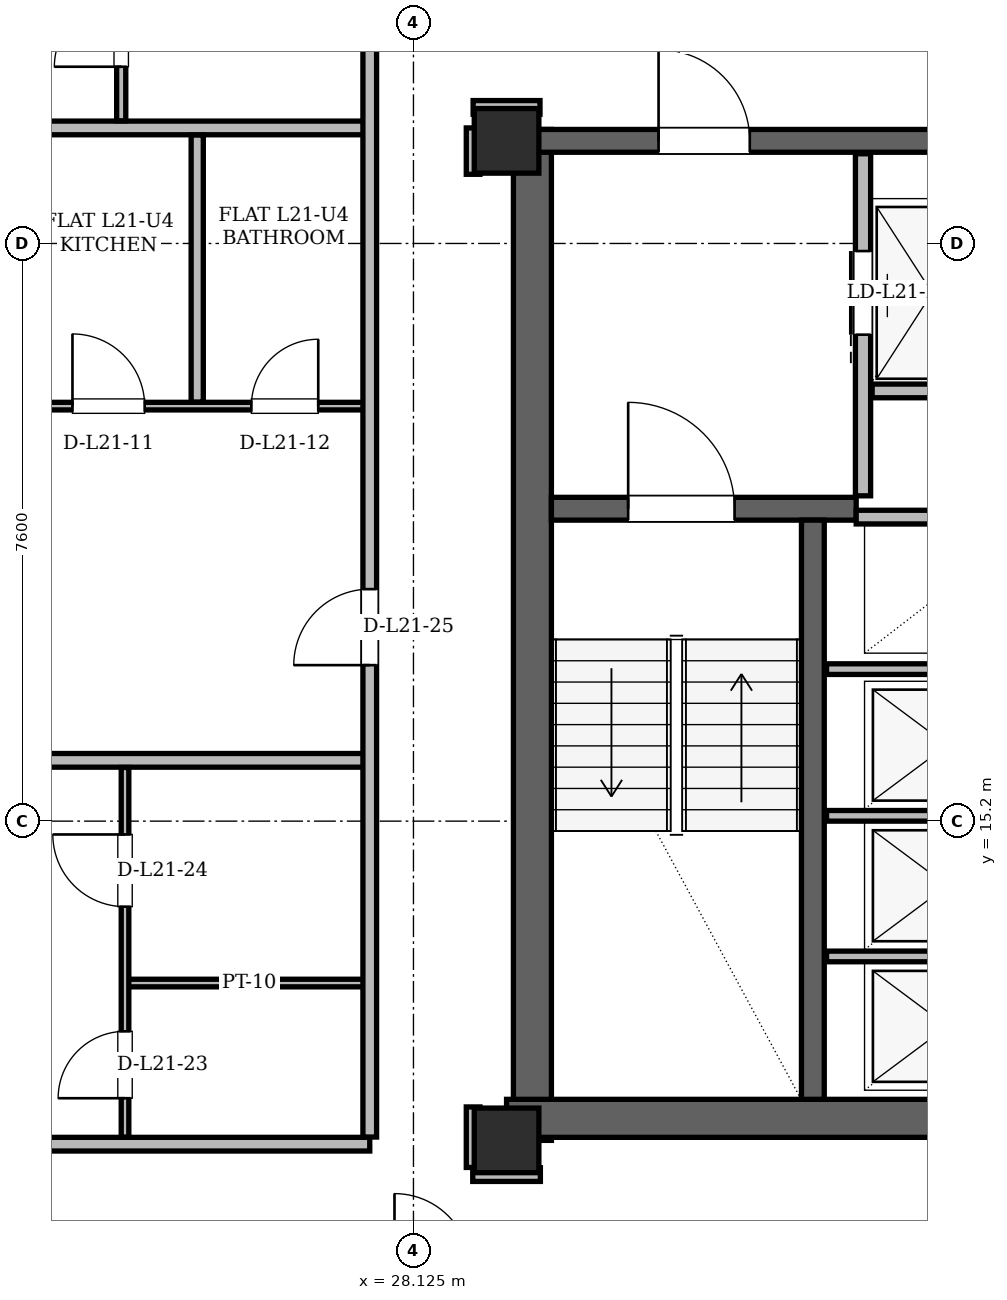
"""IFC4 building model, lengths in metres.
Left out: names, types, materials, properties, quantities, classifications, styles, units other than length and angle.
Written with IfcOpenShell. Run it as: python <this file> out.ifc"""

import sys

from ifc_helpers import new_model, si_unit, direction, frame, frame_2d, origin, origin_2d, place, context, subcontext, project, spatial, rectangle, hollow_rectangle, extrude, element, fill, save


model = new_model("IFC4")
c1 = context("Model", 3, precision=1e-05, world=origin(), true_north=direction((0.0, 1.0)))
c2 = subcontext(c1, "Body", "Model", "MODEL_VIEW")
j1 = project(units=[si_unit("LENGTHUNIT", "METRE"), si_unit("PLANEANGLEUNIT", "RADIAN")], contexts=[c1])
p1 = place(None, origin())
s1 = spatial("IfcSite", under=j1, at=p1, CompositionType="ELEMENT")
p2 = place(p1, origin())
s2 = spatial("IfcBuilding", under=s1, at=p2, CompositionType="ELEMENT")
p3 = place(p2, frame((0.0, 0.0, 82.5)))
s3 = spatial("IfcBuildingStorey", under=s2, at=p3, CompositionType="ELEMENT", Elevation=82.5)
for number, where, z_axis, x_axis in (
    (1, (29.35, 11.0, 0.0), (0.0, 0.0, 1.0), (1.0, 0.0, 0.0)),
    (2, (29.35, 24.15, 0.0), (0.0, 0.0, 1.0), (1.0, 0.0, 0.0)),
):
    element("IfcColumn", number, at=place(p3, frame(where, z_axis=z_axis, x_axis=x_axis)), inside=s3, PredefinedType="COLUMN", context=c2, shape_type="SweptSolid", body=[
        extrude(hollow_rectangle(XDim=0.85, YDim=0.85, WallThickness=0.07, at=origin_2d()), origin(), (0.0, 0.0, 1.0), 3.6),
    ])
p4 = place(p3, frame((29.69, 11.0, 0.0), z_axis=(0.0, 0.0, 1.0), x_axis=(0.0, 1.0, 0.0)))
e3 = element("IfcWall", 3, at=p4, inside=s3, PredefinedType="SHEAR", context=c2, shape_type="SweptSolid", body=[
    extrude(rectangle(XDim=13.3, YDim=0.5, at=frame_2d((6.65, 0.0))), origin(), (0.0, 0.0, 1.0), 3.36),
])
p5 = place(p3, frame((29.35, 11.29, 0.0), z_axis=(0.0, 0.0, 1.0), x_axis=(1.0, 0.0, 0.0)))
e4 = element("IfcWall", 4, at=p5, inside=s3, PredefinedType="SHEAR", context=c2, shape_type="SweptSolid", body=[
    extrude(rectangle(XDim=7.1, YDim=0.5, at=frame_2d((3.55, 0.0))), origin(), (0.0, 0.0, 1.0), 3.36),
])
p6 = place(p3, frame((29.65, 24.15, 0.0), z_axis=(0.0, 0.0, 1.0), x_axis=(1.0, 0.0, 0.0)))
e5 = element("IfcWall", 5, at=p6, inside=s3, PredefinedType="SHEAR", context=c2, shape_type="SweptSolid", body=[
    extrude(rectangle(XDim=15.7, YDim=0.3, at=frame_2d((7.85, 0.0))), origin(), (0.0, 0.0, 1.0), 3.36),
])
p7 = place(p6, frame((1.7, 0.0, 0.0)))
e6 = element("IfcOpeningElement", 6, at=p7, cuts=e5, PredefinedType="OPENING", context=c2, shape_type="SweptSolid", body=[
    extrude(rectangle(XDim=1.2, YDim=2.2, at=frame_2d((0.6, 1.1))), frame((0.0, 0.15, 0.0), z_axis=(0.0, -1.0, 0.0), x_axis=(1.0, 0.0, 0.0)), (0.0, 0.0, 1.0), 0.3),
])
p8 = place(p6, frame((12.8, 0.0, 0.0)))
e7 = element("IfcOpeningElement", 7, at=p8, cuts=e5, PredefinedType="OPENING", context=c2, shape_type="SweptSolid", body=[
    extrude(rectangle(XDim=1.2, YDim=2.2, at=frame_2d((0.6, 1.1))), frame((0.0, 0.15, 0.0), z_axis=(0.0, -1.0, 0.0), x_axis=(1.0, 0.0, 0.0)), (0.0, 0.0, 1.0), 0.3),
])
p9 = place(p6, frame((6.55, 0.0, 0.0)))
e8 = element("IfcOpeningElement", 8, at=p9, cuts=e5, PredefinedType="OPENING", context=c2, shape_type="SweptSolid", body=[
    extrude(rectangle(XDim=0.9, YDim=2.05, at=frame_2d((0.45, 1.025))), frame((0.0, 0.15, 0.0), z_axis=(0.0, -1.0, 0.0), x_axis=(1.0, 0.0, 0.0)), (0.0, 0.0, 1.0), 0.3),
])
p10 = place(p6, frame((8.45, 0.0, 0.0)))
e9 = element("IfcOpeningElement", 9, at=p10, cuts=e5, PredefinedType="OPENING", context=c2, shape_type="SweptSolid", body=[
    extrude(rectangle(XDim=0.9, YDim=2.05, at=frame_2d((0.45, 1.025))), frame((0.0, 0.15, 0.0), z_axis=(0.0, -1.0, 0.0), x_axis=(1.0, 0.0, 0.0)), (0.0, 0.0, 1.0), 0.3),
])
p11 = place(p3, frame((29.94, 19.31, 0.0), z_axis=(0.0, 0.0, 1.0), x_axis=(1.0, 0.0, 0.0)))
e10 = element("IfcWall", 10, at=p11, inside=s3, PredefinedType="SHEAR", context=c2, shape_type="SweptSolid", body=[
    extrude(rectangle(XDim=4.01, YDim=0.3, at=frame_2d((2.005, 0.0))), origin(), (0.0, 0.0, 1.0), 3.36),
])
p12 = place(p11, frame((1.01, 0.0, 0.0)))
e11 = element("IfcOpeningElement", 11, at=p12, cuts=e10, PredefinedType="OPENING", context=c2, shape_type="SweptSolid", body=[
    extrude(rectangle(XDim=1.4, YDim=2.2, at=frame_2d((0.7, 1.1))), frame((0.0, 0.15, 0.0), z_axis=(0.0, -1.0, 0.0), x_axis=(1.0, 0.0, 0.0)), (0.0, 0.0, 1.0), 0.3),
])
p13 = place(p3, frame((33.38, 11.54, 0.0), z_axis=(0.0, 0.0, 1.0), x_axis=(0.0, 1.0, 0.0)))
e12 = element("IfcWall", 12, at=p13, inside=s3, PredefinedType="SHEAR", context=c2, shape_type="SweptSolid", body=[
    extrude(rectangle(XDim=7.62, YDim=0.3, at=frame_2d((3.81, 0.0))), origin(), (0.0, 0.0, 1.0), 3.36),
])
p14 = place(p3, frame((31.079, 43.5, 0.0), z_axis=(0.0, 0.0, 1.0), x_axis=(-0.499998999238, -0.866025981574, 0.0)))
e13 = element("IfcWall", 13, at=p14, inside=s3, PredefinedType="SOLIDWALL", context=c2, shape_type="SweptSolid", body=[
    extrude(rectangle(XDim=34.108, YDim=0.34, at=frame_2d((17.054, 0.0))), origin(), (0.0, 0.0, 1.0), 2.578),
])
p15 = place(p14, frame((6.369, 0.0, 0.0)))
e14 = element("IfcOpeningElement", 14, at=p15, cuts=e13, PredefinedType="OPENING", context=c2, shape_type="SweptSolid", body=[
    extrude(rectangle(XDim=1.5, YDim=2.2, at=frame_2d((0.75, 1.1))), frame((0.0, 0.17, 0.0), z_axis=(0.0, -1.0, 0.0), x_axis=(1.0, 0.0, 0.0)), (0.0, 0.0, 1.0), 0.34),
])
p16 = place(p14, frame((26.044, 0.0, 0.0)))
e15 = element("IfcOpeningElement", 15, at=p16, cuts=e13, PredefinedType="OPENING", context=c2, shape_type="SweptSolid", body=[
    extrude(rectangle(XDim=1.5, YDim=2.2, at=frame_2d((0.75, 1.1))), frame((0.0, 0.17, 0.0), z_axis=(0.0, -1.0, 0.0), x_axis=(1.0, 0.0, 0.0)), (0.0, 0.0, 1.0), 0.34),
])
p17 = place(p14, frame((31.989, 0.0, 0.85)))
e16 = element("IfcOpeningElement", 16, at=p17, cuts=e13, PredefinedType="OPENING", context=c2, shape_type="SweptSolid", body=[
    extrude(rectangle(XDim=1.2, YDim=1.48, at=frame_2d((0.6, 0.74))), frame((0.0, 0.17, 0.0), z_axis=(0.0, -1.0, 0.0), x_axis=(1.0, 0.0, 0.0)), (0.0, 0.0, 1.0), 0.34),
])
p18 = place(p14, frame((29.607, 0.0, 0.85)))
e17 = element("IfcOpeningElement", 17, at=p18, cuts=e13, PredefinedType="OPENING", context=c2, shape_type="SweptSolid", body=[
    extrude(rectangle(XDim=1.2, YDim=1.48, at=frame_2d((0.6, 0.74))), frame((0.0, 0.17, 0.0), z_axis=(0.0, -1.0, 0.0), x_axis=(1.0, 0.0, 0.0)), (0.0, 0.0, 1.0), 0.34),
])
p19 = place(p14, frame((11.736, 0.0, 0.85)))
e18 = element("IfcOpeningElement", 18, at=p19, cuts=e13, PredefinedType="OPENING", context=c2, shape_type="SweptSolid", body=[
    extrude(rectangle(XDim=1.2, YDim=1.48, at=frame_2d((0.6, 0.74))), frame((0.0, 0.17, 0.0), z_axis=(0.0, -1.0, 0.0), x_axis=(1.0, 0.0, 0.0)), (0.0, 0.0, 1.0), 0.34),
])
p20 = place(p14, frame((14.635, 0.0, 0.85)))
e19 = element("IfcOpeningElement", 19, at=p20, cuts=e13, PredefinedType="OPENING", context=c2, shape_type="SweptSolid", body=[
    extrude(rectangle(XDim=1.2, YDim=1.48, at=frame_2d((0.6, 0.74))), frame((0.0, 0.17, 0.0), z_axis=(0.0, -1.0, 0.0), x_axis=(1.0, 0.0, 0.0)), (0.0, 0.0, 1.0), 0.34),
])
p21 = place(p14, frame((17.248, 0.0, 0.85)))
e20 = element("IfcOpeningElement", 20, at=p21, cuts=e13, PredefinedType="OPENING", context=c2, shape_type="SweptSolid", body=[
    extrude(rectangle(XDim=1.2, YDim=1.48, at=frame_2d((0.6, 0.74))), frame((0.0, 0.17, 0.0), z_axis=(0.0, -1.0, 0.0), x_axis=(1.0, 0.0, 0.0)), (0.0, 0.0, 1.0), 0.34),
])
p22 = place(p14, frame((1.22, 0.0, 0.85)))
e21 = element("IfcOpeningElement", 21, at=p22, cuts=e13, PredefinedType="OPENING", context=c2, shape_type="SweptSolid", body=[
    extrude(rectangle(XDim=1.2, YDim=1.48, at=frame_2d((0.6, 0.74))), frame((0.0, 0.17, 0.0), z_axis=(0.0, -1.0, 0.0), x_axis=(1.0, 0.0, 0.0)), (0.0, 0.0, 1.0), 0.34),
])
p23 = place(p3, frame((34.04, 19.48, 0.0), z_axis=(0.0, 0.0, 1.0), x_axis=(0.0, 1.0, 0.0)))
e22 = element("IfcWall", 22, at=p23, inside=s3, PredefinedType="PARTITIONING", context=c2, shape_type="SweptSolid", body=[
    extrude(rectangle(XDim=4.5, YDim=0.2, at=frame_2d((2.25, 0.0))), origin(), (0.0, 0.0, 1.0), 2.4),
])
p24 = place(p23, frame((2.12, 0.0, 0.0)))
e23 = element("IfcOpeningElement", 23, at=p24, cuts=e22, PredefinedType="OPENING", context=c2, shape_type="SweptSolid", body=[
    extrude(rectangle(XDim=1.1, YDim=2.2, at=frame_2d((0.55, 1.1))), frame((0.0, 0.1, 0.0), z_axis=(0.0, -1.0, 0.0), x_axis=(1.0, 0.0, 0.0)), (0.0, 0.0, 1.0), 0.2),
])
p25 = place(p3, frame((34.16, 20.86, 0.0), z_axis=(0.0, 0.0, 1.0), x_axis=(1.0, 0.0, 0.0)))
e24 = element("IfcWall", 24, at=p25, inside=s3, PredefinedType="PARTITIONING", context=c2, shape_type="SweptSolid", body=[
    extrude(rectangle(XDim=1.58, YDim=0.18, at=frame_2d((0.79, 0.0))), origin(), (0.0, 0.0, 1.0), 3.36),
])
p26 = place(p3, frame((33.95, 19.2, 0.0), z_axis=(0.0, 0.0, 1.0), x_axis=(1.0, 0.0, 0.0)))
e25 = element("IfcWall", 25, at=p26, inside=s3, PredefinedType="PARTITIONING", context=c2, shape_type="SweptSolid", body=[
    extrude(rectangle(XDim=2.27, YDim=0.18, at=frame_2d((1.135, 0.0))), origin(), (0.0, 0.0, 1.0), 3.36),
])
for number, where, z_axis, x_axis in (
    (26, (33.56, 13.42, 0.0), (0.0, 0.0, 1.0), (1.0, 0.0, 0.0)),
    (27, (33.56, 15.27, 0.0), (0.0, 0.0, 1.0), (1.0, 0.0, 0.0)),
    (28, (33.56, 17.2, 0.0), (0.0, 0.0, 1.0), (1.0, 0.0, 0.0)),
):
    element("IfcWall", number, at=place(p3, frame(where, z_axis=z_axis, x_axis=x_axis)), inside=s3, PredefinedType="PARTITIONING", context=c2, shape_type="SweptSolid", body=[
        extrude(rectangle(XDim=2.66, YDim=0.14, at=frame_2d((1.33, 0.0))), origin(), (0.0, 0.0, 1.0), 3.36),
    ])
p27 = place(p3, frame((28.905, 10.55, 0.0), z_axis=(0.0, 0.0, 1.0), x_axis=(1.0, 0.0, 0.0)))
e29 = element("IfcWall", 29, at=p27, inside=s3, PredefinedType="PARTITIONING", context=c2, shape_type="SweptSolid", body=[
    extrude(rectangle(XDim=0.89, YDim=0.18, at=frame_2d((0.445, 0.0))), origin(), (0.0, 0.0, 1.0), 3.36),
])
p28 = place(p3, frame((15.964, 10.95, 0.0), z_axis=(0.0, 0.0, 1.0), x_axis=(1.0, 0.0, 0.0)))
e30 = element("IfcWall", 30, at=p28, inside=s3, PredefinedType="PARTITIONING", context=c2, shape_type="SweptSolid", body=[
    extrude(rectangle(XDim=11.586, YDim=0.18, at=frame_2d((5.793, 0.0))), origin(), (0.0, 0.0, 1.0), 3.36),
])
p29 = place(p28, frame((4.873, 0.0, 0.0)))
e31 = element("IfcOpeningElement", 31, at=p29, cuts=e30, PredefinedType="OPENING", context=c2, shape_type="SweptSolid", body=[
    extrude(rectangle(XDim=1.0, YDim=2.18, at=frame_2d((0.5, 1.09))), frame((0.0, 0.09, 0.0), z_axis=(0.0, -1.0, 0.0), x_axis=(1.0, 0.0, 0.0)), (0.0, 0.0, 1.0), 0.18),
])
p30 = place(p3, frame((24.33, 13.07, 0.0), z_axis=(0.0, 0.0, 1.0), x_axis=(1.0, 0.0, 0.0)))
e32 = element("IfcWall", 32, at=p30, inside=s3, PredefinedType="PARTITIONING", context=c2, shape_type="SweptSolid", body=[
    extrude(rectangle(XDim=3.27, YDim=0.1, at=frame_2d((1.635, 0.0))), origin(), (0.0, 0.0, 1.0), 3.36),
])
p31 = place(p3, frame((15.403, 16.0, 0.0), z_axis=(0.0, 0.0, 1.0), x_axis=(1.0, 0.0, 0.0)))
e33 = element("IfcWall", 33, at=p31, inside=s3, PredefinedType="PARTITIONING", context=c2, shape_type="SweptSolid", body=[
    extrude(rectangle(XDim=12.147, YDim=0.18, at=frame_2d((6.074, 0.0))), origin(), (0.0, 0.0, 1.0), 3.36),
])
p32 = place(p3, frame((18.093, 20.66, 0.0), z_axis=(0.0, 0.0, 1.0), x_axis=(1.0, 0.0, 0.0)))
e34 = element("IfcWall", 34, at=p32, inside=s3, PredefinedType="PARTITIONING", context=c2, shape_type="SweptSolid", body=[
    extrude(rectangle(XDim=9.507, YDim=0.1, at=frame_2d((4.753, 0.0))), origin(), (0.0, 0.0, 1.0), 3.36),
])
p33 = place(p32, frame((0.89, 0.0, 0.0)))
e35 = element("IfcOpeningElement", 35, at=p33, cuts=e34, PredefinedType="OPENING", context=c2, shape_type="SweptSolid", body=[
    extrude(rectangle(XDim=0.95, YDim=2.1, at=frame_2d((0.475, 1.05))), frame((0.0, 0.05, 0.0), z_axis=(0.0, -1.0, 0.0), x_axis=(1.0, 0.0, 0.0)), (0.0, 0.0, 1.0), 0.1),
])
p34 = place(p32, frame((3.344, 0.0, 0.0)))
e36 = element("IfcOpeningElement", 36, at=p34, cuts=e34, PredefinedType="OPENING", context=c2, shape_type="SweptSolid", body=[
    extrude(rectangle(XDim=0.95, YDim=2.1, at=frame_2d((0.475, 1.05))), frame((0.0, 0.05, 0.0), z_axis=(0.0, -1.0, 0.0), x_axis=(1.0, 0.0, 0.0)), (0.0, 0.0, 1.0), 0.1),
])
p35 = place(p32, frame((5.545, 0.0, 0.0)))
e37 = element("IfcOpeningElement", 37, at=p35, cuts=e34, PredefinedType="OPENING", context=c2, shape_type="SweptSolid", body=[
    extrude(rectangle(XDim=0.95, YDim=2.1, at=frame_2d((0.475, 1.05))), frame((0.0, 0.05, 0.0), z_axis=(0.0, -1.0, 0.0), x_axis=(1.0, 0.0, 0.0)), (0.0, 0.0, 1.0), 0.1),
])
p36 = place(p32, frame((7.899, 0.0, 0.0)))
e38 = element("IfcOpeningElement", 38, at=p36, cuts=e34, PredefinedType="OPENING", context=c2, shape_type="SweptSolid", body=[
    extrude(rectangle(XDim=0.88, YDim=2.08, at=frame_2d((0.44, 1.04))), frame((0.0, 0.05, 0.0), z_axis=(0.0, -1.0, 0.0), x_axis=(1.0, 0.0, 0.0)), (0.0, 0.0, 1.0), 0.1),
])
p37 = place(p3, frame((20.206, 24.32, 0.0), z_axis=(0.0, 0.0, 1.0), x_axis=(1.0, 0.0, 0.0)))
e39 = element("IfcWall", 39, at=p37, inside=s3, PredefinedType="PARTITIONING", context=c2, shape_type="SweptSolid", body=[
    extrude(rectangle(XDim=7.344, YDim=0.18, at=frame_2d((3.672, 0.0))), origin(), (0.0, 0.0, 1.0), 3.36),
])
p38 = place(p3, frame((28.91, 24.59, 0.0), z_axis=(0.0, 0.0, 1.0), x_axis=(1.0, 0.0, 0.0)))
e40 = element("IfcWall", 40, at=p38, inside=s3, PredefinedType="PARTITIONING", context=c2, shape_type="SweptSolid", body=[
    extrude(rectangle(XDim=0.88, YDim=0.18, at=frame_2d((0.44, 0.0))), origin(), (0.0, 0.0, 1.0), 2.814),
])
p39 = place(p3, frame((24.28, 24.414, 0.0), z_axis=(0.0, 0.0, 1.0), x_axis=(0.0, 1.0, 0.0)))
e41 = element("IfcWall", 41, at=p39, inside=s3, PredefinedType="PARTITIONING", context=c2, shape_type="SweptSolid", body=[
    extrude(rectangle(XDim=6.962, YDim=0.12, at=frame_2d((3.481, 0.0))), origin(), (0.0, 0.0, 1.0), 2.578),
])
p40 = place(p39, frame((0.711, 0.0, 0.0)))
e42 = element("IfcOpeningElement", 42, at=p40, cuts=e41, PredefinedType="OPENING", context=c2, shape_type="SweptSolid", body=[
    extrude(rectangle(XDim=0.88, YDim=2.08, at=frame_2d((0.44, 1.04))), frame((0.0, 0.06, 0.0), z_axis=(0.0, -1.0, 0.0), x_axis=(1.0, 0.0, 0.0)), (0.0, 0.0, 1.0), 0.12),
])
p41 = place(p39, frame((4.258, 0.0, 0.0)))
e43 = element("IfcOpeningElement", 43, at=p41, cuts=e41, PredefinedType="OPENING", context=c2, shape_type="SweptSolid", body=[
    extrude(rectangle(XDim=0.95, YDim=2.1, at=frame_2d((0.475, 1.05))), frame((0.0, 0.06, 0.0), z_axis=(0.0, -1.0, 0.0), x_axis=(1.0, 0.0, 0.0)), (0.0, 0.0, 1.0), 0.12),
])
p42 = place(p3, frame((24.33, 11.044, 0.0), z_axis=(0.0, 0.0, 1.0), x_axis=(0.0, 1.0, 0.0)))
e44 = element("IfcWall", 44, at=p42, inside=s3, PredefinedType="PARTITIONING", context=c2, shape_type="SweptSolid", body=[
    extrude(rectangle(XDim=4.862, YDim=0.1, at=frame_2d((2.431, 0.0))), origin(), (0.0, 0.0, 1.0), 2.814),
])
p43 = place(p42, frame((0.511, 0.0, 0.0)))
e45 = element("IfcOpeningElement", 45, at=p43, cuts=e44, PredefinedType="OPENING", context=c2, shape_type="SweptSolid", body=[
    extrude(rectangle(XDim=0.88, YDim=2.08, at=frame_2d((0.44, 1.04))), frame((0.0, 0.05, 0.0), z_axis=(0.0, -1.0, 0.0), x_axis=(1.0, 0.0, 0.0)), (0.0, 0.0, 1.0), 0.1),
])
p44 = place(p42, frame((3.031, 0.0, 0.0)))
e46 = element("IfcOpeningElement", 46, at=p44, cuts=e44, PredefinedType="OPENING", context=c2, shape_type="SweptSolid", body=[
    extrude(rectangle(XDim=0.95, YDim=2.1, at=frame_2d((0.475, 1.05))), frame((0.0, 0.05, 0.0), z_axis=(0.0, -1.0, 0.0), x_axis=(1.0, 0.0, 0.0)), (0.0, 0.0, 1.0), 0.1),
])
p45 = place(p3, frame((25.28, 20.714, 0.0), z_axis=(0.0, 0.0, 1.0), x_axis=(0.0, 1.0, 0.0)))
e47 = element("IfcWall", 47, at=p45, inside=s3, PredefinedType="PARTITIONING", context=c2, shape_type="SweptSolid", body=[
    extrude(rectangle(XDim=3.512, YDim=0.16, at=frame_2d((1.756, 0.0))), origin(), (0.0, 0.0, 1.0), 3.36),
])
p46 = place(p3, frame((27.55, 11.044, 0.0), z_axis=(0.0, 0.0, 1.0), x_axis=(0.0, 1.0, 0.0)))
e48 = element("IfcWall", 48, at=p46, inside=s3, PredefinedType="PARTITIONING", context=c2, shape_type="SweptSolid", body=[
    extrude(rectangle(XDim=14.832, YDim=0.18, at=frame_2d((7.416, 0.0))), origin(), (0.0, 0.0, 1.0), 2.814),
])
p47 = place(p46, frame((6.208, 0.0, 0.0)))
e49 = element("IfcOpeningElement", 49, at=p47, cuts=e48, PredefinedType="OPENING", context=c2, shape_type="SweptSolid", body=[
    extrude(rectangle(XDim=1.0, YDim=2.18, at=frame_2d((0.5, 1.09))), frame((0.0, 0.09, 0.0), z_axis=(0.0, -1.0, 0.0), x_axis=(1.0, 0.0, 0.0)), (0.0, 0.0, 1.0), 0.18),
])
p48 = place(p3, frame((28.91, 10.644, 0.0), z_axis=(0.0, 0.0, 1.0), x_axis=(0.0, 1.0, 0.0)))
e50 = element("IfcWall", 50, at=p48, inside=s3, PredefinedType="PARTITIONING", context=c2, shape_type="SweptSolid", body=[
    extrude(rectangle(XDim=0.796, YDim=0.18, at=frame_2d((0.398, 0.0))), origin(), (0.0, 0.0, 1.0), 2.814),
])
p49 = place(p3, frame((28.91, 23.71, 0.0), z_axis=(0.0, 0.0, 1.0), x_axis=(0.0, 1.0, 0.0)))
e51 = element("IfcWall", 51, at=p49, inside=s3, PredefinedType="PARTITIONING", context=c2, shape_type="SweptSolid", body=[
    extrude(rectangle(XDim=0.61, YDim=0.18, at=frame_2d((0.305, 0.0))), origin(), (0.0, 0.0, 1.0), 3.36),
])
p50 = place(p24, origin())
e52 = element("IfcDoor", 52, at=p50, inside=s3, OperationType="SLIDING_TO_LEFT", PredefinedType="DOOR", context=c2, shape_type="SweptSolid", body=[
    extrude(rectangle(XDim=1.1, YDim=2.2, at=frame_2d((0.55, 1.1))), frame((0.0, 0.025, 0.0), z_axis=(0.0, -1.0, 0.0), x_axis=(1.0, 0.0, 0.0)), (0.0, 0.0, 1.0), 0.05),
])
fill(e23, e52)
p51 = place(p12, origin())
e53 = element("IfcDoor", 53, at=p51, inside=s3, OperationType="SINGLE_SWING_LEFT", PredefinedType="DOOR", context=c2, shape_type="SweptSolid", body=[
    extrude(rectangle(XDim=1.4, YDim=2.2, at=frame_2d((0.7, 1.1))), frame((0.0, 0.025, 0.0), z_axis=(0.0, -1.0, 0.0), x_axis=(1.0, 0.0, 0.0)), (0.0, 0.0, 1.0), 0.05),
])
fill(e11, e53)
p52 = place(p7, origin())
e54 = element("IfcDoor", 54, at=p52, inside=s3, OperationType="SINGLE_SWING_LEFT", PredefinedType="DOOR", context=c2, shape_type="SweptSolid", body=[
    extrude(rectangle(XDim=1.2, YDim=2.2, at=frame_2d((0.6, 1.1))), frame((0.0, 0.025, 0.0), z_axis=(0.0, -1.0, 0.0), x_axis=(1.0, 0.0, 0.0)), (0.0, 0.0, 1.0), 0.05),
])
fill(e6, e54)
p53 = place(p35, origin())
e55 = element("IfcDoor", 55, at=p53, inside=s3, OperationType="SINGLE_SWING_LEFT", PredefinedType="DOOR", context=c2, shape_type="SweptSolid", body=[
    extrude(rectangle(XDim=0.95, YDim=2.1, at=frame_2d((0.475, 1.05))), frame((0.0, 0.025, 0.0), z_axis=(0.0, -1.0, 0.0), x_axis=(1.0, 0.0, 0.0)), (0.0, 0.0, 1.0), 0.05),
])
fill(e37, e55)
p54 = place(p36, origin())
e56 = element("IfcDoor", 56, at=p54, inside=s3, OperationType="SINGLE_SWING_RIGHT", PredefinedType="DOOR", context=c2, shape_type="SweptSolid", body=[
    extrude(rectangle(XDim=0.88, YDim=2.08, at=frame_2d((0.44, 1.04))), frame((0.0, 0.025, 0.0), z_axis=(0.0, -1.0, 0.0), x_axis=(1.0, 0.0, 0.0)), (0.0, 0.0, 1.0), 0.05),
])
fill(e38, e56)
p55 = place(p40, origin())
e57 = element("IfcDoor", 57, at=p55, inside=s3, OperationType="SINGLE_SWING_LEFT", PredefinedType="DOOR", context=c2, shape_type="SweptSolid", body=[
    extrude(rectangle(XDim=0.88, YDim=2.08, at=frame_2d((0.44, 1.04))), frame((0.0, 0.025, 0.0), z_axis=(0.0, -1.0, 0.0), x_axis=(1.0, 0.0, 0.0)), (0.0, 0.0, 1.0), 0.05),
])
fill(e42, e57)
p56 = place(p43, origin())
e58 = element("IfcDoor", 58, at=p56, inside=s3, OperationType="SINGLE_SWING_LEFT", PredefinedType="DOOR", context=c2, shape_type="SweptSolid", body=[
    extrude(rectangle(XDim=0.88, YDim=2.08, at=frame_2d((0.44, 1.04))), frame((0.0, 0.025, 0.0), z_axis=(0.0, -1.0, 0.0), x_axis=(1.0, 0.0, 0.0)), (0.0, 0.0, 1.0), 0.05),
])
fill(e45, e58)
p57 = place(p44, origin())
e59 = element("IfcDoor", 59, at=p57, inside=s3, OperationType="SINGLE_SWING_RIGHT", PredefinedType="DOOR", context=c2, shape_type="SweptSolid", body=[
    extrude(rectangle(XDim=0.95, YDim=2.1, at=frame_2d((0.475, 1.05))), frame((0.0, 0.025, 0.0), z_axis=(0.0, -1.0, 0.0), x_axis=(1.0, 0.0, 0.0)), (0.0, 0.0, 1.0), 0.05),
])
fill(e46, e59)
p58 = place(p47, origin())
e60 = element("IfcDoor", 60, at=p58, inside=s3, OperationType="SINGLE_SWING_LEFT", PredefinedType="DOOR", context=c2, shape_type="SweptSolid", body=[
    extrude(rectangle(XDim=1.0, YDim=2.18, at=frame_2d((0.5, 1.09))), frame((0.0, 0.025, 0.0), z_axis=(0.0, -1.0, 0.0), x_axis=(1.0, 0.0, 0.0)), (0.0, 0.0, 1.0), 0.05),
])
fill(e49, e60)
save(model, sys.argv[1])
